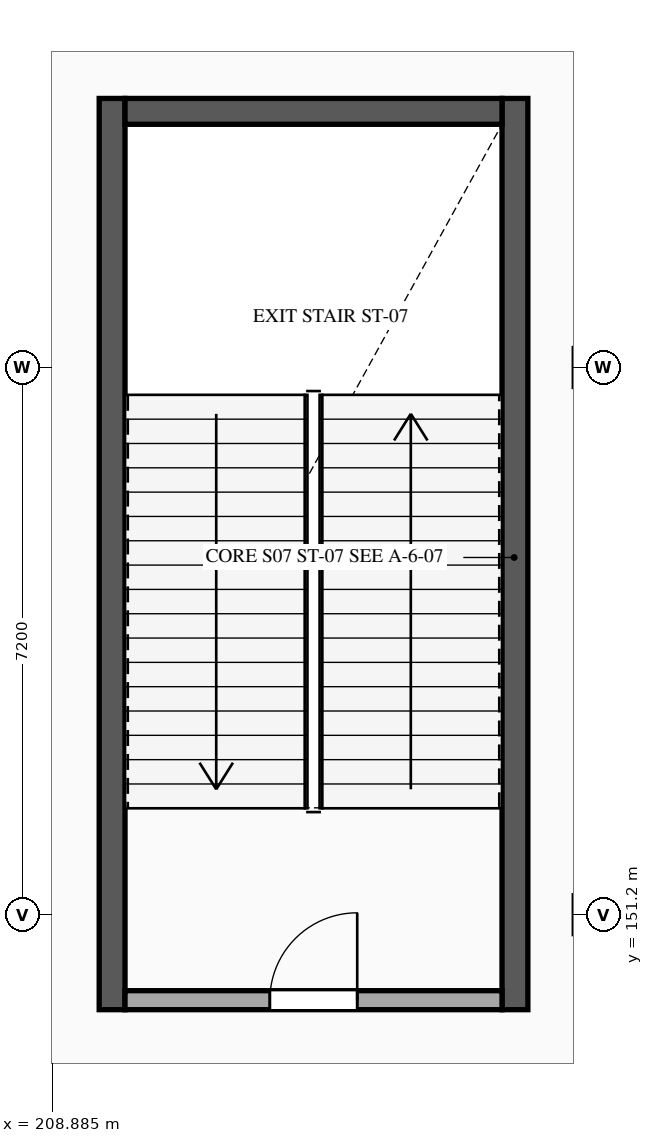
"""IFC4 building model, lengths in metres.
Left out: names, types, materials, properties, quantities, classifications, styles, units other than length and angle.
Written with IfcOpenShell. Run it as: python <this file> out.ifc"""

import sys

from ifc_helpers import new_model, si_unit, direction, frame, frame_2d, origin, place, context, subcontext, project, spatial, rectangle, extrude, element, fill, save


model = new_model("IFC4")
c1 = context("Model", 3, precision=1e-05, world=origin(), true_north=direction((0.0, 1.0)))
c2 = subcontext(c1, "Body", "Model", "MODEL_VIEW")
j1 = project(units=[si_unit("LENGTHUNIT", "METRE"), si_unit("PLANEANGLEUNIT", "RADIAN")], contexts=[c1])
p1 = place(None, origin())
s1 = spatial("IfcSite", under=j1, at=p1, CompositionType="ELEMENT")
p2 = place(p1, origin())
s2 = spatial("IfcBuilding", under=s1, at=p2, CompositionType="ELEMENT")
p3 = place(p2, frame((0.0, 0.0, 5.4)))
s3 = spatial("IfcBuildingStorey", under=s2, at=p3, CompositionType="ELEMENT", Elevation=5.4)
for number, where, z_axis, x_axis in (
    (1, (209.67, 149.95, 0.0), (0.0, 0.0, 1.0), (0.0, 1.0, 0.0)),
    (2, (214.97, 161.94, 0.0), (0.0, 0.0, 1.0), (0.0, -1.0, 0.0)),
):
    element("IfcWall", number, at=place(p3, frame(where, z_axis=z_axis, x_axis=x_axis)), inside=s3, PredefinedType="SHEAR", context=c2, shape_type="SweptSolid", body=[
        extrude(rectangle(XDim=11.99, YDim=0.34, at=frame_2d((5.995, 0.0))), origin(), (0.0, 0.0, 1.0), 4.98),
    ])
p4 = place(p3, frame((209.84, 161.77, 0.0), z_axis=(0.0, 0.0, 1.0), x_axis=(1.0, 0.0, 0.0)))
e3 = element("IfcWall", 3, at=p4, inside=s3, PredefinedType="SHEAR", context=c2, shape_type="SweptSolid", body=[
    extrude(rectangle(XDim=4.96, YDim=0.34, at=frame_2d((2.48, 0.0))), origin(), (0.0, 0.0, 1.0), 4.98),
])
p5 = place(p3, frame((209.84, 150.075, 0.0), z_axis=(0.0, 0.0, 1.0), x_axis=(1.0, 0.0, 0.0)))
e4 = element("IfcWall", 4, at=p5, inside=s3, PredefinedType="STANDARD", context=c2, shape_type="SweptSolid", body=[
    extrude(rectangle(XDim=4.96, YDim=0.25, at=frame_2d((2.48, 0.0))), origin(), (0.0, 0.0, 1.0), 4.98),
])
p6 = place(p5, frame((1.905, 0.0, 0.0)))
e5 = element("IfcOpeningElement", 5, at=p6, cuts=e4, PredefinedType="OPENING", context=c2, shape_type="SweptSolid", body=[
    extrude(rectangle(XDim=1.15, YDim=2.2, at=frame_2d((0.575, 1.1))), frame((0.0, 0.135, 0.0), z_axis=(0.0, -1.0, 0.0), x_axis=(1.0, 0.0, 0.0)), (0.0, 0.0, 1.0), 0.27),
])
p7 = place(p6, origin())
e6 = element("IfcDoor", 6, at=p7, inside=s3, OperationType="SINGLE_SWING_RIGHT", PredefinedType="DOOR", context=c2, shape_type="SweptSolid", body=[
    extrude(rectangle(XDim=1.15, YDim=2.2, at=frame_2d((0.575, 1.1))), frame((0.0, 0.025, 0.0), z_axis=(0.0, -1.0, 0.0), x_axis=(1.0, 0.0, 0.0)), (0.0, 0.0, 1.0), 0.05),
])
fill(e5, e6)
save(model, sys.argv[1])
